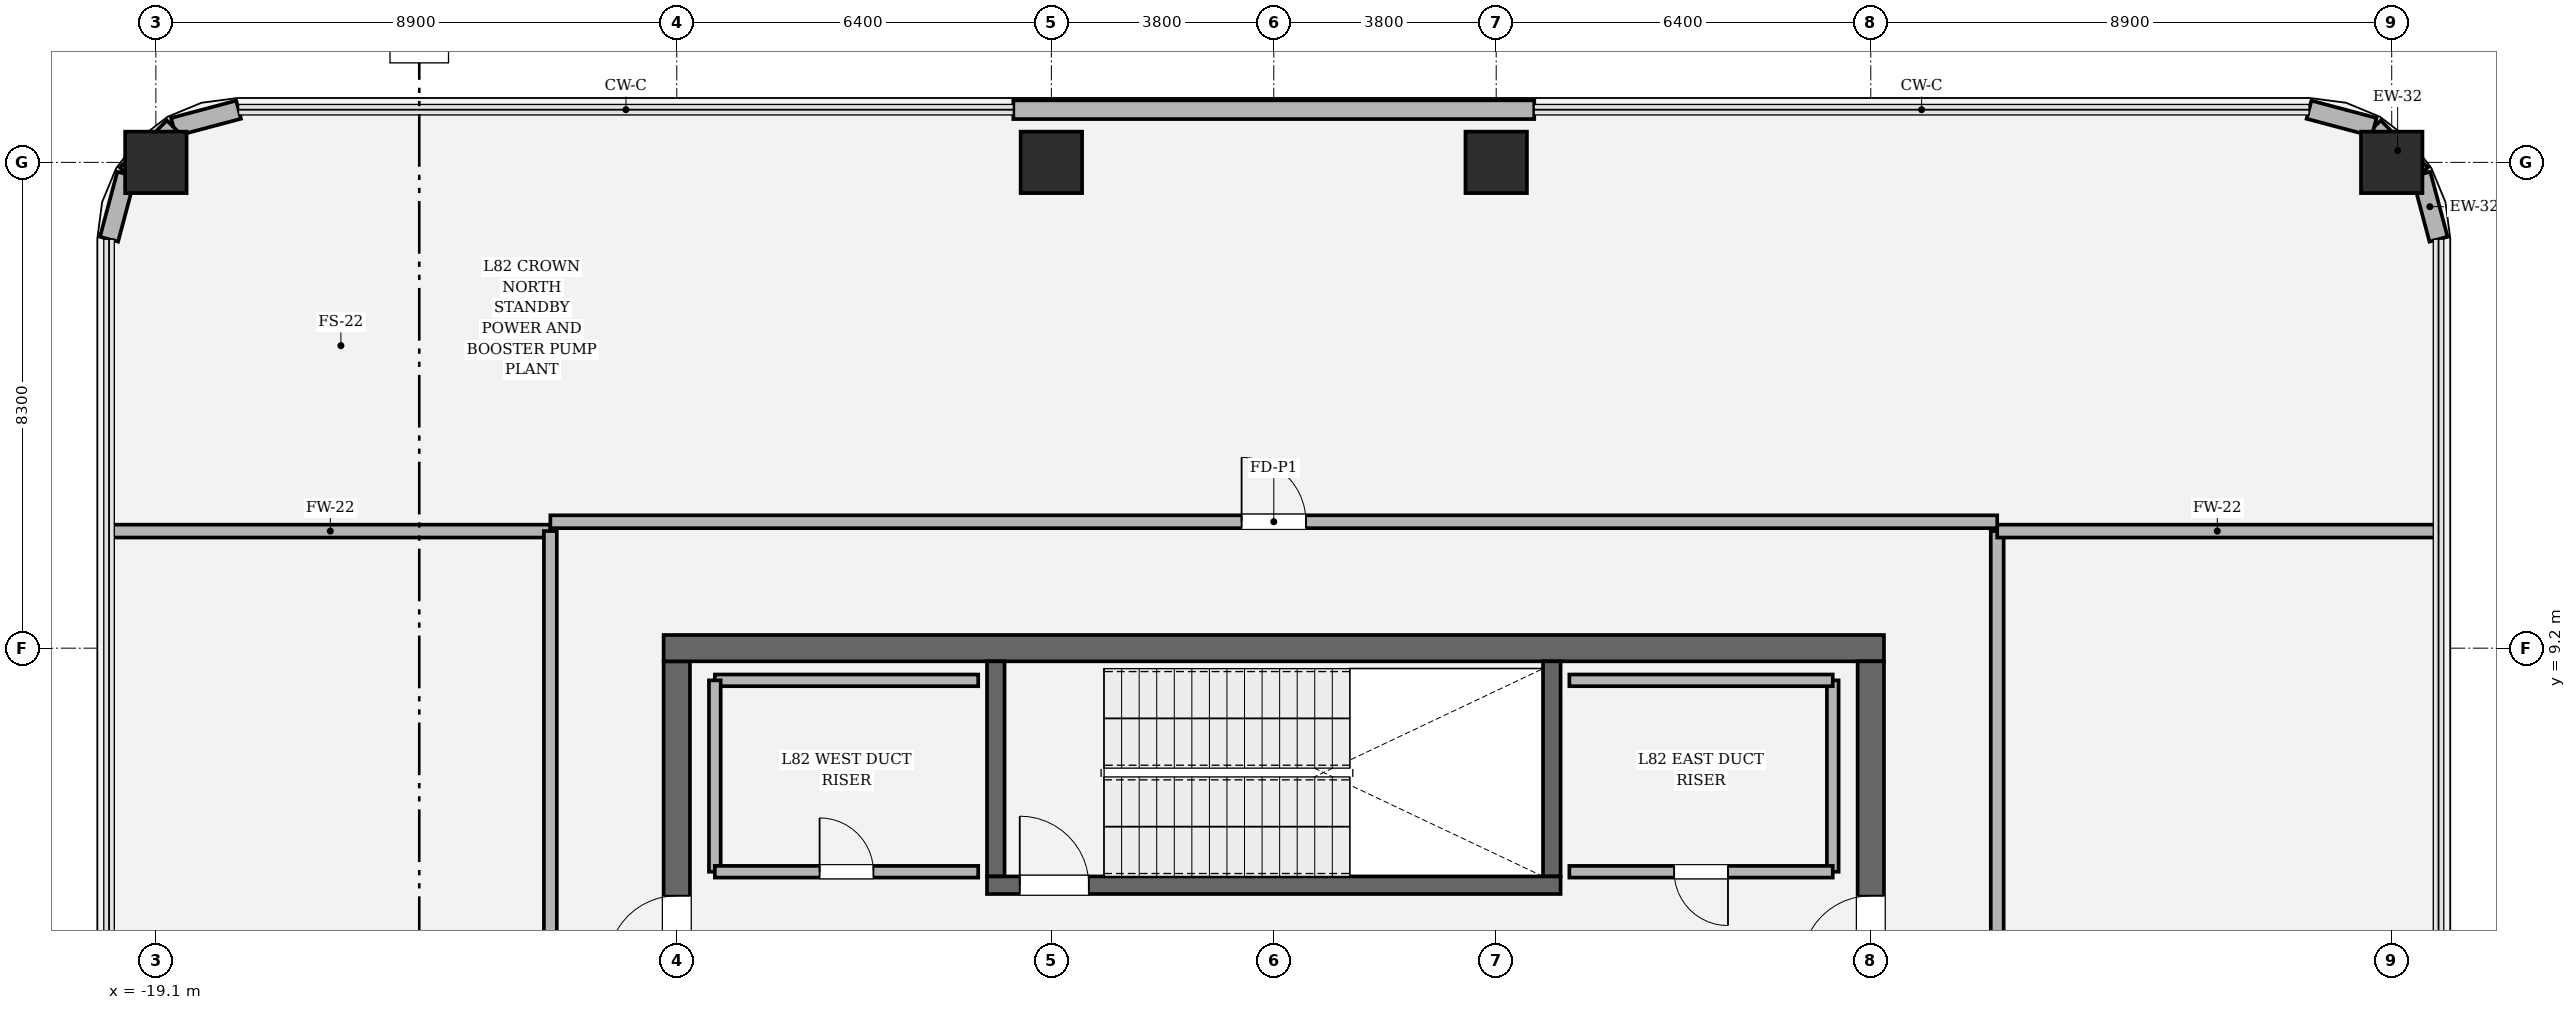
"""IFC4 building model, lengths in metres.
Left out: names, types, materials, properties, quantities, classifications, styles, units other than length and angle.
Written with IfcOpenShell. Run it as: python <this file> out.ifc"""

import sys

from ifc_helpers import new_model, si_unit, direction, frame, frame_2d, origin, origin_2d, place, context, subcontext, project, spatial, rectangle, hollow_rectangle, extrude, element, fill, save


model = new_model("IFC4")
c1 = context("Model", 3, precision=1e-05, world=origin(), true_north=direction((0.0, 1.0)))
c2 = subcontext(c1, "Body", "Model", "MODEL_VIEW")
j1 = project(units=[si_unit("LENGTHUNIT", "METRE"), si_unit("PLANEANGLEUNIT", "RADIAN")], contexts=[c1])
p1 = place(None, origin())
s1 = spatial("IfcSite", under=j1, at=p1, CompositionType="ELEMENT")
p2 = place(p1, origin())
s2 = spatial("IfcBuilding", under=s1, at=p2, CompositionType="ELEMENT")
p3 = place(p2, frame((0.0, 0.0, 348.3)))
s3 = spatial("IfcBuildingStorey", under=s2, at=p3, CompositionType="ELEMENT", Elevation=348.3)
p4 = place(p3, frame((-10.2, -8.975, 0.0), z_axis=(0.0, 0.0, 1.0), x_axis=(0.0, 1.0, 0.0)))
e1 = element("IfcWall", 1, at=p4, inside=s3, PredefinedType="SHEAR", context=c2, shape_type="SweptSolid", body=[
    extrude(rectangle(XDim=17.95, YDim=0.45, at=frame_2d((8.975, 0.0))), origin(), (0.0, 0.0, 1.0), 4.5),
])
p5 = place(p4, frame((12.765, 0.0, 0.0)))
e2 = element("IfcOpeningElement", 2, at=p5, cuts=e1, PredefinedType="OPENING", context=c2, shape_type="SweptSolid", body=[
    extrude(rectangle(XDim=1.18, YDim=2.2, at=frame_2d((0.59, 1.1))), frame((0.0, 0.235, 0.0), z_axis=(0.0, -1.0, 0.0), x_axis=(1.0, 0.0, 0.0)), (0.0, 0.0, 1.0), 0.47),
])
p6 = place(p3, frame((-10.425, 9.2, 0.0), z_axis=(0.0, 0.0, 1.0), x_axis=(1.0, 0.0, 0.0)))
e3 = element("IfcWall", 3, at=p6, inside=s3, PredefinedType="SHEAR", context=c2, shape_type="SweptSolid", body=[
    extrude(rectangle(XDim=20.85, YDim=0.45, at=frame_2d((10.425, 0.0))), origin(), (0.0, 0.0, 1.0), 4.5),
])
p7 = place(p3, frame((10.2, 8.975, 0.0), z_axis=(0.0, 0.0, 1.0), x_axis=(0.0, -1.0, 0.0)))
e4 = element("IfcWall", 4, at=p7, inside=s3, PredefinedType="SHEAR", context=c2, shape_type="SweptSolid", body=[
    extrude(rectangle(XDim=17.95, YDim=0.45, at=frame_2d((8.975, 0.0))), origin(), (0.0, 0.0, 1.0), 4.5),
])
p8 = place(p7, frame((4.005, 0.0, 0.0)))
e5 = element("IfcOpeningElement", 5, at=p8, cuts=e4, PredefinedType="OPENING", context=c2, shape_type="SweptSolid", body=[
    extrude(rectangle(XDim=1.18, YDim=2.2, at=frame_2d((0.59, 1.1))), frame((0.0, 0.235, 0.0), z_axis=(0.0, -1.0, 0.0), x_axis=(1.0, 0.0, 0.0)), (0.0, 0.0, 1.0), 0.47),
])
for number, where, z_axis, x_axis in (
    (6, (-4.75, 5.3, 0.0), (0.0, 0.0, 1.0), (0.0, 1.0, 0.0)),
    (7, (4.75, 8.975, 0.0), (0.0, 0.0, 1.0), (0.0, -1.0, 0.0)),
):
    element("IfcWall", number, at=place(p3, frame(where, z_axis=z_axis, x_axis=x_axis)), inside=s3, PredefinedType="SOLIDWALL", context=c2, shape_type="SweptSolid", body=[
        extrude(rectangle(XDim=3.675, YDim=0.3, at=frame_2d((1.837, 0.0))), origin(), (0.0, 0.0, 1.0), 4.5),
    ])
p9 = place(p3, frame((-4.9, 5.15, 0.0), z_axis=(0.0, 0.0, 1.0), x_axis=(1.0, 0.0, 0.0)))
e8 = element("IfcWall", 8, at=p9, inside=s3, PredefinedType="SOLIDWALL", context=c2, shape_type="SweptSolid", body=[
    extrude(rectangle(XDim=9.8, YDim=0.3, at=frame_2d((4.9, 0.0))), origin(), (0.0, 0.0, 1.0), 4.5),
])
p10 = place(p9, frame((0.56, 0.0, 0.0)))
e9 = element("IfcOpeningElement", 9, at=p10, cuts=e8, PredefinedType="OPENING", context=c2, shape_type="SweptSolid", body=[
    extrude(rectangle(XDim=1.18, YDim=2.2, at=frame_2d((0.59, 1.1))), frame((0.0, 0.16, 0.0), z_axis=(0.0, -1.0, 0.0), x_axis=(1.0, 0.0, 0.0)), (0.0, 0.0, 1.0), 0.32),
])
for number, where, z_axis, x_axis in (
    (10, (19.1, 17.5, 0.0), (0.0, 0.0, 1.0), (1.0, 0.0, 0.0)),
    (11, (3.8, 17.5, 0.0), (0.0, 0.0, 1.0), (1.0, 0.0, 0.0)),
    (12, (-3.8, 17.5, 0.0), (0.0, 0.0, 1.0), (1.0, 0.0, 0.0)),
    (13, (-19.1, 17.5, 0.0), (0.0, 0.0, 1.0), (1.0, 0.0, 0.0)),
):
    element("IfcColumn", number, at=place(p3, frame(where, z_axis=z_axis, x_axis=x_axis)), inside=s3, PredefinedType="COLUMN", context=c2, shape_type="SweptSolid", body=[
        extrude(hollow_rectangle(XDim=1.05, YDim=1.05, WallThickness=0.03, at=origin_2d()), origin(), (0.0, 0.0, 1.0), 4.5),
    ])
p11 = place(p3, frame((19.9, 16.187, 0.0), z_axis=(0.0, 0.0, 1.0), x_axis=(-0.257332533551, 0.966322910406, 0.0)))
e14 = element("IfcWall", 14, at=p11, inside=s3, PredefinedType="SOLIDWALL", context=c2, shape_type="SweptSolid", body=[
    extrude(rectangle(XDim=1.151, YDim=0.32, at=frame_2d((0.575, 0.0))), origin(), (0.0, 0.0, 1.0), 4.22),
])
p12 = place(p3, frame((19.604, 17.299, 0.0), z_axis=(0.0, 0.0, 1.0), x_axis=(-0.707106781187, 0.707106781187, 0.0)))
e15 = element("IfcWall", 15, at=p12, inside=s3, PredefinedType="SOLIDWALL", context=c2, shape_type="SweptSolid", body=[
    extrude(rectangle(XDim=1.138, YDim=0.32, at=frame_2d((0.569, 0.0))), origin(), (0.0, 0.0, 1.0), 3.894),
])
p13 = place(p3, frame((18.799, 18.104, 0.0), z_axis=(0.0, 0.0, 1.0), x_axis=(-0.966322910406, 0.257332533551, 0.0)))
e16 = element("IfcWall", 16, at=p13, inside=s3, PredefinedType="SOLIDWALL", context=c2, shape_type="SweptSolid", body=[
    extrude(rectangle(XDim=1.151, YDim=0.32, at=frame_2d((0.575, 0.0))), origin(), (0.0, 0.0, 1.0), 4.22),
])
p14 = place(p3, frame((4.45, 18.4, 0.0), z_axis=(0.0, 0.0, 1.0), x_axis=(-1.0, 0.0, 0.0)))
e17 = element("IfcWall", 17, at=p14, inside=s3, PredefinedType="SOLIDWALL", context=c2, shape_type="SweptSolid", body=[
    extrude(rectangle(XDim=8.9, YDim=0.32, at=frame_2d((4.45, 0.0))), origin(), (0.0, 0.0, 1.0), 4.22),
])
p15 = place(p3, frame((-17.687, 18.4, 0.0), z_axis=(0.0, 0.0, 1.0), x_axis=(-0.966322910406, -0.257332533551, 0.0)))
e18 = element("IfcWall", 18, at=p15, inside=s3, PredefinedType="SOLIDWALL", context=c2, shape_type="SweptSolid", body=[
    extrude(rectangle(XDim=1.151, YDim=0.32, at=frame_2d((0.575, 0.0))), origin(), (0.0, 0.0, 1.0), 4.22),
])
p16 = place(p3, frame((-18.799, 18.104, 0.0), z_axis=(0.0, 0.0, 1.0), x_axis=(-0.707106781187, -0.707106781187, 0.0)))
e19 = element("IfcWall", 19, at=p16, inside=s3, PredefinedType="SOLIDWALL", context=c2, shape_type="SweptSolid", body=[
    extrude(rectangle(XDim=1.138, YDim=0.32, at=frame_2d((0.569, 0.0))), origin(), (0.0, 0.0, 1.0), 3.894),
])
p17 = place(p3, frame((-19.604, 17.299, 0.0), z_axis=(0.0, 0.0, 1.0), x_axis=(-0.257332533551, -0.966322910406, 0.0)))
e20 = element("IfcWall", 20, at=p17, inside=s3, PredefinedType="SOLIDWALL", context=c2, shape_type="SweptSolid", body=[
    extrude(rectangle(XDim=1.151, YDim=0.32, at=frame_2d((0.575, 0.0))), origin(), (0.0, 0.0, 1.0), 4.22),
])
p18 = place(p3, frame((-5.05, 8.65, 0.0), z_axis=(0.0, 0.0, 1.0), x_axis=(-1.0, 0.0, 0.0)))
e21 = element("IfcWall", 21, at=p18, inside=s3, PredefinedType="SOLIDWALL", context=c2, shape_type="SweptSolid", body=[
    extrude(rectangle(XDim=4.5, YDim=0.2, at=frame_2d((2.25, 0.0))), origin(), (0.0, 0.0, 1.0), 4.22),
])
p19 = place(p3, frame((-9.55, 8.65, 0.0), z_axis=(0.0, 0.0, 1.0), x_axis=(0.0, -1.0, 0.0)))
e22 = element("IfcWall", 22, at=p19, inside=s3, PredefinedType="SOLIDWALL", context=c2, shape_type="SweptSolid", body=[
    extrude(rectangle(XDim=3.27, YDim=0.2, at=frame_2d((1.635, 0.0))), origin(), (0.0, 0.0, 1.0), 4.22),
])
p20 = place(p3, frame((-9.55, 5.38, 0.0), z_axis=(0.0, 0.0, 1.0), x_axis=(1.0, 0.0, 0.0)))
e23 = element("IfcWall", 23, at=p20, inside=s3, PredefinedType="SOLIDWALL", context=c2, shape_type="SweptSolid", body=[
    extrude(rectangle(XDim=4.5, YDim=0.2, at=frame_2d((2.25, 0.0))), origin(), (0.0, 0.0, 1.0), 4.22),
])
p21 = place(p20, frame((1.79, 0.0, 0.0)))
e24 = element("IfcOpeningElement", 24, at=p21, cuts=e23, PredefinedType="OPENING", context=c2, shape_type="SweptSolid", body=[
    extrude(rectangle(XDim=0.92, YDim=2.1, at=frame_2d((0.46, 1.05))), frame((0.0, 0.11, 0.0), z_axis=(0.0, -1.0, 0.0), x_axis=(1.0, 0.0, 0.0)), (0.0, 0.0, 1.0), 0.22),
])
p22 = place(p3, frame((9.55, 5.38, 0.0), z_axis=(0.0, 0.0, 1.0), x_axis=(0.0, 1.0, 0.0)))
e25 = element("IfcWall", 25, at=p22, inside=s3, PredefinedType="SOLIDWALL", context=c2, shape_type="SweptSolid", body=[
    extrude(rectangle(XDim=3.27, YDim=0.2, at=frame_2d((1.635, 0.0))), origin(), (0.0, 0.0, 1.0), 4.22),
])
p23 = place(p3, frame((9.55, 8.65, 0.0), z_axis=(0.0, 0.0, 1.0), x_axis=(-1.0, 0.0, 0.0)))
e26 = element("IfcWall", 26, at=p23, inside=s3, PredefinedType="SOLIDWALL", context=c2, shape_type="SweptSolid", body=[
    extrude(rectangle(XDim=4.5, YDim=0.2, at=frame_2d((2.25, 0.0))), origin(), (0.0, 0.0, 1.0), 4.22),
])
p24 = place(p3, frame((5.05, 5.38, 0.0), z_axis=(0.0, 0.0, 1.0), x_axis=(1.0, 0.0, 0.0)))
e27 = element("IfcWall", 27, at=p24, inside=s3, PredefinedType="SOLIDWALL", context=c2, shape_type="SweptSolid", body=[
    extrude(rectangle(XDim=4.5, YDim=0.2, at=frame_2d((2.25, 0.0))), origin(), (0.0, 0.0, 1.0), 4.22),
])
p25 = place(p24, frame((1.79, 0.0, 0.0)))
e28 = element("IfcOpeningElement", 28, at=p25, cuts=e27, PredefinedType="OPENING", context=c2, shape_type="SweptSolid", body=[
    extrude(rectangle(XDim=0.92, YDim=2.1, at=frame_2d((0.46, 1.05))), frame((0.0, 0.11, 0.0), z_axis=(0.0, -1.0, 0.0), x_axis=(1.0, 0.0, 0.0)), (0.0, 0.0, 1.0), 0.22),
])
p26 = place(p3, frame((-19.88, 11.2, 0.0), z_axis=(0.0, 0.0, 1.0), x_axis=(1.0, 0.0, 0.0)))
e29 = element("IfcWall", 29, at=p26, inside=s3, PredefinedType="SOLIDWALL", context=c2, shape_type="SweptSolid", body=[
    extrude(rectangle(XDim=7.52, YDim=0.22, at=frame_2d((3.76, 0.0))), origin(), (0.0, 0.0, 1.0), 2.934),
])
p27 = place(p3, frame((-12.36, 11.2, 0.0), z_axis=(0.0, 0.0, 1.0), x_axis=(0.0, -1.0, 0.0)))
e30 = element("IfcWall", 30, at=p27, inside=s3, PredefinedType="SOLIDWALL", context=c2, shape_type="SweptSolid", body=[
    extrude(rectangle(XDim=22.4, YDim=0.22, at=frame_2d((11.2, 0.0))), origin(), (0.0, 0.0, 1.0), 2.934),
])
p28 = place(p27, frame((10.65, 0.0, 0.0)))
e31 = element("IfcOpeningElement", 31, at=p28, cuts=e30, PredefinedType="OPENING", context=c2, shape_type="SweptSolid", body=[
    extrude(rectangle(XDim=1.1, YDim=2.2, at=frame_2d((0.55, 1.1))), frame((0.0, 0.12, 0.0), z_axis=(0.0, -1.0, 0.0), x_axis=(1.0, 0.0, 0.0)), (0.0, 0.0, 1.0), 0.24),
])
p29 = place(p3, frame((12.36, -11.2, 0.0), z_axis=(0.0, 0.0, 1.0), x_axis=(0.0, 1.0, 0.0)))
e32 = element("IfcWall", 32, at=p29, inside=s3, PredefinedType="SOLIDWALL", context=c2, shape_type="SweptSolid", body=[
    extrude(rectangle(XDim=22.4, YDim=0.22, at=frame_2d((11.2, 0.0))), origin(), (0.0, 0.0, 1.0), 2.934),
])
p30 = place(p29, frame((10.65, 0.0, 0.0)))
e33 = element("IfcOpeningElement", 33, at=p30, cuts=e32, PredefinedType="OPENING", context=c2, shape_type="SweptSolid", body=[
    extrude(rectangle(XDim=1.1, YDim=2.2, at=frame_2d((0.55, 1.1))), frame((0.0, 0.12, 0.0), z_axis=(0.0, -1.0, 0.0), x_axis=(1.0, 0.0, 0.0)), (0.0, 0.0, 1.0), 0.24),
])
p31 = place(p3, frame((12.36, 11.2, 0.0), z_axis=(0.0, 0.0, 1.0), x_axis=(1.0, 0.0, 0.0)))
e34 = element("IfcWall", 34, at=p31, inside=s3, PredefinedType="SOLIDWALL", context=c2, shape_type="SweptSolid", body=[
    extrude(rectangle(XDim=7.52, YDim=0.22, at=frame_2d((3.76, 0.0))), origin(), (0.0, 0.0, 1.0), 2.934),
])
p32 = place(p3, frame((12.36, 11.36, 0.0), z_axis=(0.0, 0.0, 1.0), x_axis=(-1.0, 0.0, 0.0)))
e35 = element("IfcWall", 35, at=p32, inside=s3, PredefinedType="SOLIDWALL", context=c2, shape_type="SweptSolid", body=[
    extrude(rectangle(XDim=24.72, YDim=0.22, at=frame_2d((12.36, 0.0))), origin(), (0.0, 0.0, 1.0), 2.934),
])
p33 = place(p32, frame((11.81, 0.0, 0.0)))
e36 = element("IfcOpeningElement", 36, at=p33, cuts=e35, PredefinedType="OPENING", context=c2, shape_type="SweptSolid", body=[
    extrude(rectangle(XDim=1.1, YDim=2.2, at=frame_2d((0.55, 1.1))), frame((0.0, 0.12, 0.0), z_axis=(0.0, -1.0, 0.0), x_axis=(1.0, 0.0, 0.0)), (0.0, 0.0, 1.0), 0.24),
])
p34 = place(p10, origin())
e37 = element("IfcDoor", 37, at=p34, inside=s3, OperationType="SINGLE_SWING_LEFT", PredefinedType="DOOR", context=c2, shape_type="SweptSolid", body=[
    extrude(rectangle(XDim=1.18, YDim=2.2, at=frame_2d((0.59, 1.1))), frame((0.0, 0.025, 0.0), z_axis=(0.0, -1.0, 0.0), x_axis=(1.0, 0.0, 0.0)), (0.0, 0.0, 1.0), 0.05),
])
fill(e9, e37)
p35 = place(p5, origin())
e38 = element("IfcDoor", 38, at=p35, inside=s3, OperationType="SINGLE_SWING_LEFT", PredefinedType="DOOR", context=c2, shape_type="SweptSolid", body=[
    extrude(rectangle(XDim=1.18, YDim=2.2, at=frame_2d((0.59, 1.1))), frame((0.0, 0.025, 0.0), z_axis=(0.0, -1.0, 0.0), x_axis=(1.0, 0.0, 0.0)), (0.0, 0.0, 1.0), 0.05),
])
fill(e2, e38)
p36 = place(p8, origin())
e39 = element("IfcDoor", 39, at=p36, inside=s3, OperationType="SINGLE_SWING_RIGHT", PredefinedType="DOOR", context=c2, shape_type="SweptSolid", body=[
    extrude(rectangle(XDim=1.18, YDim=2.2, at=frame_2d((0.59, 1.1))), frame((0.0, 0.025, 0.0), z_axis=(0.0, -1.0, 0.0), x_axis=(1.0, 0.0, 0.0)), (0.0, 0.0, 1.0), 0.05),
])
fill(e5, e39)
p37 = place(p21, origin())
e40 = element("IfcDoor", 40, at=p37, inside=s3, OperationType="SINGLE_SWING_LEFT", PredefinedType="DOOR", context=c2, shape_type="SweptSolid", body=[
    extrude(rectangle(XDim=0.92, YDim=2.1, at=frame_2d((0.46, 1.05))), frame((0.0, 0.025, 0.0), z_axis=(0.0, -1.0, 0.0), x_axis=(1.0, 0.0, 0.0)), (0.0, 0.0, 1.0), 0.05),
])
fill(e24, e40)
p38 = place(p25, origin())
e41 = element("IfcDoor", 41, at=p38, inside=s3, OperationType="SINGLE_SWING_RIGHT", PredefinedType="DOOR", context=c2, shape_type="SweptSolid", body=[
    extrude(rectangle(XDim=0.92, YDim=2.1, at=frame_2d((0.46, 1.05))), frame((0.0, 0.025, 0.0), z_axis=(0.0, -1.0, 0.0), x_axis=(1.0, 0.0, 0.0)), (0.0, 0.0, 1.0), 0.05),
])
fill(e28, e41)
p39 = place(p33, origin())
e42 = element("IfcDoor", 42, at=p39, inside=s3, OperationType="SINGLE_SWING_RIGHT", PredefinedType="DOOR", context=c2, shape_type="SweptSolid", body=[
    extrude(rectangle(XDim=1.1, YDim=2.2, at=frame_2d((0.55, 1.1))), frame((0.0, 0.025, 0.0), z_axis=(0.0, -1.0, 0.0), x_axis=(1.0, 0.0, 0.0)), (0.0, 0.0, 1.0), 0.05),
])
fill(e36, e42)
save(model, sys.argv[1])
